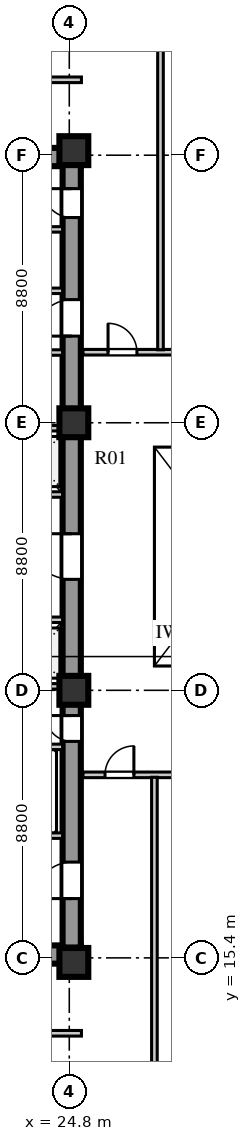
"""IFC4 building model, lengths in metres.
Left out: names, types, materials, properties, quantities, classifications, styles, units other than length and angle.
Written with IfcOpenShell. Run it as: python <this file> out.ifc"""

import sys

from ifc_helpers import new_model, si_unit, direction, frame, frame_2d, origin, origin_2d, place, context, subcontext, project, spatial, rectangle, extrude, element, fill, save


model = new_model("IFC4")
c1 = context("Model", 3, precision=1e-05, world=origin(), true_north=direction((0.0, 1.0)))
c2 = subcontext(c1, "Body", "Model", "MODEL_VIEW")
j1 = project(units=[si_unit("LENGTHUNIT", "METRE"), si_unit("PLANEANGLEUNIT", "RADIAN")], contexts=[c1])
p1 = place(None, origin())
s1 = spatial("IfcSite", under=j1, at=p1, CompositionType="ELEMENT")
p2 = place(p1, origin())
s2 = spatial("IfcBuilding", under=s1, at=p2, CompositionType="ELEMENT")
p3 = place(p2, frame((0.0, 0.0, 74.0)))
s3 = spatial("IfcBuildingStorey", under=s2, at=p3, CompositionType="ELEMENT", Elevation=74.0)
for number, where, z_axis, x_axis in (
    (1, (15.3, 15.51, 0.0), (0.0, 0.0, 1.0), (1.0, 0.0, 0.0)),
    (2, (15.3, 41.74, 0.0), (0.0, 0.0, 1.0), (1.0, 0.0, 0.0)),
):
    element("IfcWall", number, at=place(p3, frame(where, z_axis=z_axis, x_axis=x_axis)), inside=s3, PredefinedType="SHEAR", context=c2, shape_type="SweptSolid", body=[
        extrude(rectangle(XDim=9.88, YDim=0.6, at=frame_2d((4.94, 0.0))), origin(), (0.0, 0.0, 1.0), 3.72),
    ])
p4 = place(p3, frame((24.88, 15.74, 0.0), z_axis=(0.0, 0.0, 1.0), x_axis=(0.0, 1.0, 0.0)))
e3 = element("IfcWall", 3, at=p4, inside=s3, PredefinedType="SHEAR", context=c2, shape_type="SweptSolid", body=[
    extrude(rectangle(XDim=25.76, YDim=0.6, at=frame_2d((12.88, 0.0))), origin(), (0.0, 0.0, 1.0), 3.72),
])
p5 = place(p4, frame((1.61, 0.0, 0.0)))
e4 = element("IfcOpeningElement", 4, at=p5, cuts=e3, PredefinedType="OPENING", context=c2, shape_type="SweptSolid", body=[
    extrude(rectangle(XDim=1.2, YDim=2.1, at=frame_2d((0.6, 1.05))), frame((0.0, 0.31, 0.0), z_axis=(0.0, -1.0, 0.0), x_axis=(1.0, 0.0, 0.0)), (0.0, 0.0, 1.0), 0.62),
])
p6 = place(p4, frame((6.78, 0.0, 0.0)))
e5 = element("IfcOpeningElement", 5, at=p6, cuts=e3, PredefinedType="OPENING", context=c2, shape_type="SweptSolid", body=[
    extrude(rectangle(XDim=0.85, YDim=2.06, at=frame_2d((0.425, 1.03))), frame((0.0, 0.31, 0.0), z_axis=(0.0, -1.0, 0.0), x_axis=(1.0, 0.0, 0.0)), (0.0, 0.0, 1.0), 0.62),
])
p7 = place(p4, frame((12.11, 0.0, 0.0)))
e6 = element("IfcOpeningElement", 6, at=p7, cuts=e3, PredefinedType="OPENING", context=c2, shape_type="SweptSolid", body=[
    extrude(rectangle(XDim=1.5, YDim=2.12, at=frame_2d((0.75, 1.06))), frame((0.0, 0.31, 0.0), z_axis=(0.0, -1.0, 0.0), x_axis=(1.0, 0.0, 0.0)), (0.0, 0.0, 1.0), 0.62),
])
p8 = place(p4, frame((20.11, 0.0, 0.0)))
e7 = element("IfcOpeningElement", 7, at=p8, cuts=e3, PredefinedType="OPENING", context=c2, shape_type="SweptSolid", body=[
    extrude(rectangle(XDim=1.2, YDim=2.12, at=frame_2d((0.6, 1.06))), frame((0.0, 0.31, 0.0), z_axis=(0.0, -1.0, 0.0), x_axis=(1.0, 0.0, 0.0)), (0.0, 0.0, 1.0), 0.62),
])
p9 = place(p4, frame((24.01, 0.0, 0.0)))
e8 = element("IfcOpeningElement", 8, at=p9, cuts=e3, PredefinedType="OPENING", context=c2, shape_type="SweptSolid", body=[
    extrude(rectangle(XDim=0.95, YDim=2.1, at=frame_2d((0.475, 1.05))), frame((0.0, 0.31, 0.0), z_axis=(0.0, -1.0, 0.0), x_axis=(1.0, 0.0, 0.0)), (0.0, 0.0, 1.0), 0.62),
])
for number, where, z_axis, x_axis in (
    (9, (24.95, 15.25, 0.0), (0.0, 0.0, 1.0), (1.0, 0.0, 0.0)),
    (10, (24.95, 24.2, 0.0), (0.0, 0.0, 1.0), (1.0, 0.0, 0.0)),
    (11, (24.95, 33.0, 0.0), (0.0, 0.0, 1.0), (1.0, 0.0, 0.0)),
    (12, (24.95, 41.95, 0.0), (0.0, 0.0, 1.0), (1.0, 0.0, 0.0)),
):
    element("IfcColumn", number, at=place(p3, frame(where, z_axis=z_axis, x_axis=x_axis)), inside=s3, PredefinedType="COLUMN", context=c2, shape_type="SweptSolid", body=[
        extrude(rectangle(XDim=0.95, YDim=0.95, at=origin_2d()), origin(), (0.0, 0.0, 1.0), 3.72),
    ])
p10 = place(p3, frame((19.64, 19.42, 0.0), z_axis=(0.0, 0.0, 1.0), x_axis=(1.0, 0.0, 0.0)))
e13 = element("IfcWall", 13, at=p10, inside=s3, PredefinedType="SOLIDWALL", context=c2, shape_type="SweptSolid", body=[
    extrude(rectangle(XDim=4.94, YDim=0.18, at=frame_2d((2.47, 0.0))), origin(), (0.0, 0.0, 1.0), 3.72),
])
p11 = place(p10, frame((0.72, 0.0, 0.0)))
e14 = element("IfcOpeningElement", 14, at=p11, cuts=e13, PredefinedType="OPENING", context=c2, shape_type="SweptSolid", body=[
    extrude(rectangle(XDim=1.1, YDim=2.1, at=frame_2d((0.55, 1.05))), frame((0.0, 0.1, 0.0), z_axis=(0.0, -1.0, 0.0), x_axis=(1.0, 0.0, 0.0)), (0.0, 0.0, 1.0), 0.2),
])
p12 = place(p10, frame((3.02, 0.0, 0.0)))
e15 = element("IfcOpeningElement", 15, at=p12, cuts=e13, PredefinedType="OPENING", context=c2, shape_type="SweptSolid", body=[
    extrude(rectangle(XDim=1.1, YDim=2.1, at=frame_2d((0.55, 1.05))), frame((0.0, 0.1, 0.0), z_axis=(0.0, -1.0, 0.0), x_axis=(1.0, 0.0, 0.0)), (0.0, 0.0, 1.0), 0.2),
])
p13 = place(p3, frame((19.64, 22.34, 0.0), z_axis=(0.0, 0.0, 1.0), x_axis=(1.0, 0.0, 0.0)))
e16 = element("IfcWall", 16, at=p13, inside=s3, PredefinedType="SOLIDWALL", context=c2, shape_type="SweptSolid", body=[
    extrude(rectangle(XDim=4.94, YDim=0.18, at=frame_2d((2.47, 0.0))), origin(), (0.0, 0.0, 1.0), 3.72),
])
p14 = place(p3, frame((15.9, 26.52, 0.0), z_axis=(0.0, 0.0, 1.0), x_axis=(1.0, 0.0, 0.0)))
e17 = element("IfcWall", 17, at=p14, inside=s3, PredefinedType="SOLIDWALL", context=c2, shape_type="SweptSolid", body=[
    extrude(rectangle(XDim=8.68, YDim=0.18, at=frame_2d((4.34, 0.0))), origin(), (0.0, 0.0, 1.0), 3.72),
])
p15 = place(p14, frame((1.76, 0.0, 0.0)))
e18 = element("IfcOpeningElement", 18, at=p15, cuts=e17, PredefinedType="OPENING", context=c2, shape_type="SweptSolid", body=[
    extrude(rectangle(XDim=1.0, YDim=2.1, at=frame_2d((0.5, 1.05))), frame((0.0, 0.1, 0.0), z_axis=(0.0, -1.0, 0.0), x_axis=(1.0, 0.0, 0.0)), (0.0, 0.0, 1.0), 0.2),
])
p16 = place(p14, frame((3.6, 0.0, 0.0)))
e19 = element("IfcOpeningElement", 19, at=p16, cuts=e17, PredefinedType="OPENING", context=c2, shape_type="SweptSolid", body=[
    extrude(rectangle(XDim=1.0, YDim=2.1, at=frame_2d((0.5, 1.05))), frame((0.0, 0.1, 0.0), z_axis=(0.0, -1.0, 0.0), x_axis=(1.0, 0.0, 0.0)), (0.0, 0.0, 1.0), 0.2),
])
p17 = place(p14, frame((5.44, 0.0, 0.0)))
e20 = element("IfcOpeningElement", 20, at=p17, cuts=e17, PredefinedType="OPENING", context=c2, shape_type="SweptSolid", body=[
    extrude(rectangle(XDim=1.0, YDim=2.1, at=frame_2d((0.5, 1.05))), frame((0.0, 0.1, 0.0), z_axis=(0.0, -1.0, 0.0), x_axis=(1.0, 0.0, 0.0)), (0.0, 0.0, 1.0), 0.2),
])
p18 = place(p14, frame((7.28, 0.0, 0.0)))
e21 = element("IfcOpeningElement", 21, at=p18, cuts=e17, PredefinedType="OPENING", context=c2, shape_type="SweptSolid", body=[
    extrude(rectangle(XDim=1.0, YDim=2.1, at=frame_2d((0.5, 1.05))), frame((0.0, 0.1, 0.0), z_axis=(0.0, -1.0, 0.0), x_axis=(1.0, 0.0, 0.0)), (0.0, 0.0, 1.0), 0.2),
])
p19 = place(p3, frame((15.9, 24.33, 0.0), z_axis=(0.0, 0.0, 1.0), x_axis=(1.0, 0.0, 0.0)))
e22 = element("IfcWall", 22, at=p19, inside=s3, PredefinedType="SOLIDWALL", context=c2, shape_type="SweptSolid", body=[
    extrude(rectangle(XDim=8.68, YDim=0.18, at=frame_2d((4.34, 0.0))), origin(), (0.0, 0.0, 1.0), 3.02),
])
p20 = place(p3, frame((15.9, 30.64, 0.0), z_axis=(0.0, 0.0, 1.0), x_axis=(1.0, 0.0, 0.0)))
e23 = element("IfcWall", 23, at=p20, inside=s3, PredefinedType="SOLIDWALL", context=c2, shape_type="SweptSolid", body=[
    extrude(rectangle(XDim=8.68, YDim=0.18, at=frame_2d((4.34, 0.0))), origin(), (0.0, 0.0, 1.0), 3.72),
])
p21 = place(p20, frame((1.76, 0.0, 0.0)))
e24 = element("IfcOpeningElement", 24, at=p21, cuts=e23, PredefinedType="OPENING", context=c2, shape_type="SweptSolid", body=[
    extrude(rectangle(XDim=1.0, YDim=2.1, at=frame_2d((0.5, 1.05))), frame((0.0, 0.1, 0.0), z_axis=(0.0, -1.0, 0.0), x_axis=(1.0, 0.0, 0.0)), (0.0, 0.0, 1.0), 0.2),
])
p22 = place(p20, frame((3.6, 0.0, 0.0)))
e25 = element("IfcOpeningElement", 25, at=p22, cuts=e23, PredefinedType="OPENING", context=c2, shape_type="SweptSolid", body=[
    extrude(rectangle(XDim=1.0, YDim=2.1, at=frame_2d((0.5, 1.05))), frame((0.0, 0.1, 0.0), z_axis=(0.0, -1.0, 0.0), x_axis=(1.0, 0.0, 0.0)), (0.0, 0.0, 1.0), 0.2),
])
p23 = place(p20, frame((5.44, 0.0, 0.0)))
e26 = element("IfcOpeningElement", 26, at=p23, cuts=e23, PredefinedType="OPENING", context=c2, shape_type="SweptSolid", body=[
    extrude(rectangle(XDim=1.0, YDim=2.1, at=frame_2d((0.5, 1.05))), frame((0.0, 0.1, 0.0), z_axis=(0.0, -1.0, 0.0), x_axis=(1.0, 0.0, 0.0)), (0.0, 0.0, 1.0), 0.2),
])
p24 = place(p20, frame((7.28, 0.0, 0.0)))
e27 = element("IfcOpeningElement", 27, at=p24, cuts=e23, PredefinedType="OPENING", context=c2, shape_type="SweptSolid", body=[
    extrude(rectangle(XDim=1.0, YDim=2.1, at=frame_2d((0.5, 1.05))), frame((0.0, 0.1, 0.0), z_axis=(0.0, -1.0, 0.0), x_axis=(1.0, 0.0, 0.0)), (0.0, 0.0, 1.0), 0.2),
])
p25 = place(p3, frame((15.9, 32.82, 0.0), z_axis=(0.0, 0.0, 1.0), x_axis=(1.0, 0.0, 0.0)))
e28 = element("IfcWall", 28, at=p25, inside=s3, PredefinedType="SOLIDWALL", context=c2, shape_type="SweptSolid", body=[
    extrude(rectangle(XDim=8.68, YDim=0.18, at=frame_2d((4.34, 0.0))), origin(), (0.0, 0.0, 1.0), 3.02),
])
p26 = place(p3, frame((22.02, 35.31, 0.0), z_axis=(0.0, 0.0, 1.0), x_axis=(1.0, 0.0, 0.0)))
e29 = element("IfcWall", 29, at=p26, inside=s3, PredefinedType="SOLIDWALL", context=c2, shape_type="SweptSolid", body=[
    extrude(rectangle(XDim=2.56, YDim=0.18, at=frame_2d((1.28, 0.0))), origin(), (0.0, 0.0, 1.0), 3.72),
])
p27 = place(p26, frame((0.55, 0.0, 0.0)))
e30 = element("IfcOpeningElement", 30, at=p27, cuts=e29, PredefinedType="OPENING", context=c2, shape_type="SweptSolid", body=[
    extrude(rectangle(XDim=1.0, YDim=2.1, at=frame_2d((0.5, 1.05))), frame((0.0, 0.1, 0.0), z_axis=(0.0, -1.0, 0.0), x_axis=(1.0, 0.0, 0.0)), (0.0, 0.0, 1.0), 0.2),
])
p28 = place(p3, frame((19.64, 37.34, 0.0), z_axis=(0.0, 0.0, 1.0), x_axis=(1.0, 0.0, 0.0)))
e31 = element("IfcWall", 31, at=p28, inside=s3, PredefinedType="SOLIDWALL", context=c2, shape_type="SweptSolid", body=[
    extrude(rectangle(XDim=4.94, YDim=0.18, at=frame_2d((2.47, 0.0))), origin(), (0.0, 0.0, 1.0), 3.72),
])
p29 = place(p28, frame((0.45, 0.0, 0.0)))
e32 = element("IfcOpeningElement", 32, at=p29, cuts=e31, PredefinedType="OPENING", context=c2, shape_type="SweptSolid", body=[
    extrude(rectangle(XDim=1.0, YDim=2.1, at=frame_2d((0.5, 1.05))), frame((0.0, 0.1, 0.0), z_axis=(0.0, -1.0, 0.0), x_axis=(1.0, 0.0, 0.0)), (0.0, 0.0, 1.0), 0.2),
])
p30 = place(p28, frame((2.5, 0.0, 0.0)))
e33 = element("IfcOpeningElement", 33, at=p30, cuts=e31, PredefinedType="OPENING", context=c2, shape_type="SweptSolid", body=[
    extrude(rectangle(XDim=1.0, YDim=2.1, at=frame_2d((0.5, 1.05))), frame((0.0, 0.1, 0.0), z_axis=(0.0, -1.0, 0.0), x_axis=(1.0, 0.0, 0.0)), (0.0, 0.0, 1.0), 0.2),
])
p31 = place(p3, frame((19.64, 39.36, 0.0), z_axis=(0.0, 0.0, 1.0), x_axis=(1.0, 0.0, 0.0)))
e34 = element("IfcWall", 34, at=p31, inside=s3, PredefinedType="SOLIDWALL", context=c2, shape_type="SweptSolid", body=[
    extrude(rectangle(XDim=4.94, YDim=0.18, at=frame_2d((2.47, 0.0))), origin(), (0.0, 0.0, 1.0), 3.72),
])
p32 = place(p3, frame((25.25, 21.42, 0.0), z_axis=(0.0, 0.0, 1.0), x_axis=(1.0, 0.0, 0.0)))
e35 = element("IfcWall", 35, at=p32, inside=s3, PredefinedType="SOLIDWALL", context=c2, shape_type="SweptSolid", body=[
    extrude(rectangle(XDim=12.87, YDim=0.185, at=frame_2d((6.435, 0.0))), origin(), (0.0, 0.0, 1.0), 3.32),
])
p33 = place(p32, frame((0.725, 0.0, 0.0)))
e36 = element("IfcOpeningElement", 36, at=p33, cuts=e35, PredefinedType="OPENING", context=c2, shape_type="SweptSolid", body=[
    extrude(rectangle(XDim=0.95, YDim=2.08, at=frame_2d((0.475, 1.04))), frame((0.0, 0.103, 0.0), z_axis=(0.0, -1.0, 0.0), x_axis=(1.0, 0.0, 0.0)), (0.0, 0.0, 1.0), 0.205),
])
p34 = place(p32, frame((3.025, 0.0, 0.0)))
e37 = element("IfcOpeningElement", 37, at=p34, cuts=e35, PredefinedType="OPENING", context=c2, shape_type="SweptSolid", body=[
    extrude(rectangle(XDim=0.95, YDim=2.08, at=frame_2d((0.475, 1.04))), frame((0.0, 0.103, 0.0), z_axis=(0.0, -1.0, 0.0), x_axis=(1.0, 0.0, 0.0)), (0.0, 0.0, 1.0), 0.205),
])
p35 = place(p32, frame((5.325, 0.0, 0.0)))
e38 = element("IfcOpeningElement", 38, at=p35, cuts=e35, PredefinedType="OPENING", context=c2, shape_type="SweptSolid", body=[
    extrude(rectangle(XDim=0.95, YDim=2.08, at=frame_2d((0.475, 1.04))), frame((0.0, 0.103, 0.0), z_axis=(0.0, -1.0, 0.0), x_axis=(1.0, 0.0, 0.0)), (0.0, 0.0, 1.0), 0.205),
])
p36 = place(p32, frame((7.625, 0.0, 0.0)))
e39 = element("IfcOpeningElement", 39, at=p36, cuts=e35, PredefinedType="OPENING", context=c2, shape_type="SweptSolid", body=[
    extrude(rectangle(XDim=0.95, YDim=2.08, at=frame_2d((0.475, 1.04))), frame((0.0, 0.103, 0.0), z_axis=(0.0, -1.0, 0.0), x_axis=(1.0, 0.0, 0.0)), (0.0, 0.0, 1.0), 0.205),
])
p37 = place(p32, frame((9.725, 0.0, 0.0)))
e40 = element("IfcOpeningElement", 40, at=p37, cuts=e35, PredefinedType="OPENING", context=c2, shape_type="SweptSolid", body=[
    extrude(rectangle(XDim=0.95, YDim=2.08, at=frame_2d((0.475, 1.04))), frame((0.0, 0.103, 0.0), z_axis=(0.0, -1.0, 0.0), x_axis=(1.0, 0.0, 0.0)), (0.0, 0.0, 1.0), 0.205),
])
p38 = place(p32, frame((11.495, 0.0, 0.0)))
e41 = element("IfcOpeningElement", 41, at=p38, cuts=e35, PredefinedType="OPENING", context=c2, shape_type="SweptSolid", body=[
    extrude(rectangle(XDim=0.95, YDim=2.08, at=frame_2d((0.475, 1.04))), frame((0.0, 0.103, 0.0), z_axis=(0.0, -1.0, 0.0), x_axis=(1.0, 0.0, 0.0)), (0.0, 0.0, 1.0), 0.205),
])
p39 = place(p3, frame((25.25, 35.32, 0.0), z_axis=(0.0, 0.0, 1.0), x_axis=(1.0, 0.0, 0.0)))
e42 = element("IfcWall", 42, at=p39, inside=s3, PredefinedType="SOLIDWALL", context=c2, shape_type="SweptSolid", body=[
    extrude(rectangle(XDim=9.47, YDim=0.185, at=frame_2d((4.735, 0.0))), origin(), (0.0, 0.0, 1.0), 3.72),
])
p40 = place(p39, frame((0.825, 0.0, 0.0)))
e43 = element("IfcOpeningElement", 43, at=p40, cuts=e42, PredefinedType="OPENING", context=c2, shape_type="SweptSolid", body=[
    extrude(rectangle(XDim=0.95, YDim=2.08, at=frame_2d((0.475, 1.04))), frame((0.0, 0.103, 0.0), z_axis=(0.0, -1.0, 0.0), x_axis=(1.0, 0.0, 0.0)), (0.0, 0.0, 1.0), 0.205),
])
p41 = place(p39, frame((3.775, 0.0, 0.0)))
e44 = element("IfcOpeningElement", 44, at=p41, cuts=e42, PredefinedType="OPENING", context=c2, shape_type="SweptSolid", body=[
    extrude(rectangle(XDim=0.95, YDim=2.08, at=frame_2d((0.475, 1.04))), frame((0.0, 0.103, 0.0), z_axis=(0.0, -1.0, 0.0), x_axis=(1.0, 0.0, 0.0)), (0.0, 0.0, 1.0), 0.205),
])
p42 = place(p39, frame((7.215, 0.0, 0.0)))
e45 = element("IfcOpeningElement", 45, at=p42, cuts=e42, PredefinedType="OPENING", context=c2, shape_type="SweptSolid", body=[
    extrude(rectangle(XDim=0.95, YDim=2.08, at=frame_2d((0.475, 1.04))), frame((0.0, 0.103, 0.0), z_axis=(0.0, -1.0, 0.0), x_axis=(1.0, 0.0, 0.0)), (0.0, 0.0, 1.0), 0.205),
])
p43 = place(p3, frame((10.5, 12.92, 0.0), z_axis=(0.0, 0.0, 1.0), x_axis=(1.0, 0.0, 0.0)))
e46 = element("IfcWall", 46, at=p43, inside=s3, PredefinedType="SOLIDWALL", context=c2, shape_type="SweptSolid", body=[
    extrude(rectangle(XDim=14.7, YDim=0.185, at=frame_2d((7.35, 0.0))), origin(), (0.0, 0.0, 1.0), 3.72),
])
p44 = place(p43, frame((6.2, 0.0, 0.0)))
e47 = element("IfcOpeningElement", 47, at=p44, cuts=e46, PredefinedType="OPENING", context=c2, shape_type="SweptSolid", body=[
    extrude(rectangle(XDim=1.0, YDim=2.08, at=frame_2d((0.5, 1.04))), frame((0.0, 0.103, 0.0), z_axis=(0.0, -1.0, 0.0), x_axis=(1.0, 0.0, 0.0)), (0.0, 0.0, 1.0), 0.205),
])
p45 = place(p3, frame((10.5, 44.28, 0.0), z_axis=(0.0, 0.0, 1.0), x_axis=(1.0, 0.0, 0.0)))
e48 = element("IfcWall", 48, at=p45, inside=s3, PredefinedType="SOLIDWALL", context=c2, shape_type="SweptSolid", body=[
    extrude(rectangle(XDim=14.7, YDim=0.185, at=frame_2d((7.35, 0.0))), origin(), (0.0, 0.0, 1.0), 3.72),
])
p46 = place(p45, frame((6.2, 0.0, 0.0)))
e49 = element("IfcOpeningElement", 49, at=p46, cuts=e48, PredefinedType="OPENING", context=c2, shape_type="SweptSolid", body=[
    extrude(rectangle(XDim=1.0, YDim=2.08, at=frame_2d((0.5, 1.04))), frame((0.0, 0.103, 0.0), z_axis=(0.0, -1.0, 0.0), x_axis=(1.0, 0.0, 0.0)), (0.0, 0.0, 1.0), 0.205),
])
p47 = place(p3, frame((27.6, 6.88, 0.0), z_axis=(0.0, 0.0, 1.0), x_axis=(0.0, 1.0, 0.0)))
e50 = element("IfcWall", 50, at=p47, inside=s3, PredefinedType="SOLIDWALL", context=c2, shape_type="SweptSolid", body=[
    extrude(rectangle(XDim=14.46, YDim=0.185, at=frame_2d((7.23, 0.0))), origin(), (0.0, 0.0, 1.0), 3.72),
])
p48 = place(p3, frame((27.8, 35.4, 0.0), z_axis=(0.0, 0.0, 1.0), x_axis=(0.0, 1.0, 0.0)))
e51 = element("IfcWall", 51, at=p48, inside=s3, PredefinedType="SOLIDWALL", context=c2, shape_type="SweptSolid", body=[
    extrude(rectangle(XDim=14.92, YDim=0.185, at=frame_2d((7.46, 0.0))), origin(), (0.0, 0.0, 1.0), 3.72),
])
p49 = place(p5, frame((1.2, 0.0, 0.0), z_axis=(0.0, 0.0, 1.0), x_axis=(-1.0, 0.0, 0.0)))
e52 = element("IfcDoor", 52, at=p49, inside=s3, OperationType="SINGLE_SWING_RIGHT", PredefinedType="DOOR", context=c2, shape_type="SweptSolid", body=[
    extrude(rectangle(XDim=1.2, YDim=2.1, at=frame_2d((0.6, 1.05))), frame((0.0, 0.025, 0.0), z_axis=(0.0, -1.0, 0.0), x_axis=(1.0, 0.0, 0.0)), (0.0, 0.0, 1.0), 0.05),
])
fill(e4, e52)
p50 = place(p6, frame((0.85, 0.0, 0.0), z_axis=(0.0, 0.0, 1.0), x_axis=(-1.0, 0.0, 0.0)))
e53 = element("IfcDoor", 53, at=p50, inside=s3, OperationType="SINGLE_SWING_LEFT", PredefinedType="DOOR", context=c2, shape_type="SweptSolid", body=[
    extrude(rectangle(XDim=0.85, YDim=2.06, at=frame_2d((0.425, 1.03))), frame((0.0, 0.025, 0.0), z_axis=(0.0, -1.0, 0.0), x_axis=(1.0, 0.0, 0.0)), (0.0, 0.0, 1.0), 0.05),
])
fill(e5, e53)
p51 = place(p7, frame((1.5, 0.0, 0.0), z_axis=(0.0, 0.0, 1.0), x_axis=(-1.0, 0.0, 0.0)))
e54 = element("IfcDoor", 54, at=p51, inside=s3, OperationType="SINGLE_SWING_LEFT", PredefinedType="DOOR", context=c2, shape_type="SweptSolid", body=[
    extrude(rectangle(XDim=1.5, YDim=2.12, at=frame_2d((0.75, 1.06))), frame((0.0, 0.025, 0.0), z_axis=(0.0, -1.0, 0.0), x_axis=(1.0, 0.0, 0.0)), (0.0, 0.0, 1.0), 0.05),
])
fill(e6, e54)
p52 = place(p8, frame((1.2, 0.0, 0.0), z_axis=(0.0, 0.0, 1.0), x_axis=(-1.0, 0.0, 0.0)))
e55 = element("IfcDoor", 55, at=p52, inside=s3, OperationType="SINGLE_SWING_RIGHT", PredefinedType="DOOR", context=c2, shape_type="SweptSolid", body=[
    extrude(rectangle(XDim=1.2, YDim=2.12, at=frame_2d((0.6, 1.06))), frame((0.0, 0.025, 0.0), z_axis=(0.0, -1.0, 0.0), x_axis=(1.0, 0.0, 0.0)), (0.0, 0.0, 1.0), 0.05),
])
fill(e7, e55)
p53 = place(p9, frame((0.95, 0.0, 0.0), z_axis=(0.0, 0.0, 1.0), x_axis=(-1.0, 0.0, 0.0)))
e56 = element("IfcDoor", 56, at=p53, inside=s3, OperationType="SINGLE_SWING_LEFT", PredefinedType="DOOR", context=c2, shape_type="SweptSolid", body=[
    extrude(rectangle(XDim=0.95, YDim=2.1, at=frame_2d((0.475, 1.05))), frame((0.0, 0.025, 0.0), z_axis=(0.0, -1.0, 0.0), x_axis=(1.0, 0.0, 0.0)), (0.0, 0.0, 1.0), 0.05),
])
fill(e8, e56)
p54 = place(p33, frame((0.95, 0.0, 0.0), z_axis=(0.0, 0.0, 1.0), x_axis=(-1.0, 0.0, 0.0)))
e57 = element("IfcDoor", 57, at=p54, inside=s3, OperationType="SINGLE_SWING_LEFT", PredefinedType="DOOR", context=c2, shape_type="SweptSolid", body=[
    extrude(rectangle(XDim=0.95, YDim=2.08, at=frame_2d((0.475, 1.04))), frame((0.0, 0.025, 0.0), z_axis=(0.0, -1.0, 0.0), x_axis=(1.0, 0.0, 0.0)), (0.0, 0.0, 1.0), 0.05),
])
fill(e36, e57)
p55 = place(p40, origin())
e58 = element("IfcDoor", 58, at=p55, inside=s3, OperationType="SINGLE_SWING_LEFT", PredefinedType="DOOR", context=c2, shape_type="SweptSolid", body=[
    extrude(rectangle(XDim=0.95, YDim=2.08, at=frame_2d((0.475, 1.04))), frame((0.0, 0.025, 0.0), z_axis=(0.0, -1.0, 0.0), x_axis=(1.0, 0.0, 0.0)), (0.0, 0.0, 1.0), 0.05),
])
fill(e43, e58)
save(model, sys.argv[1])
